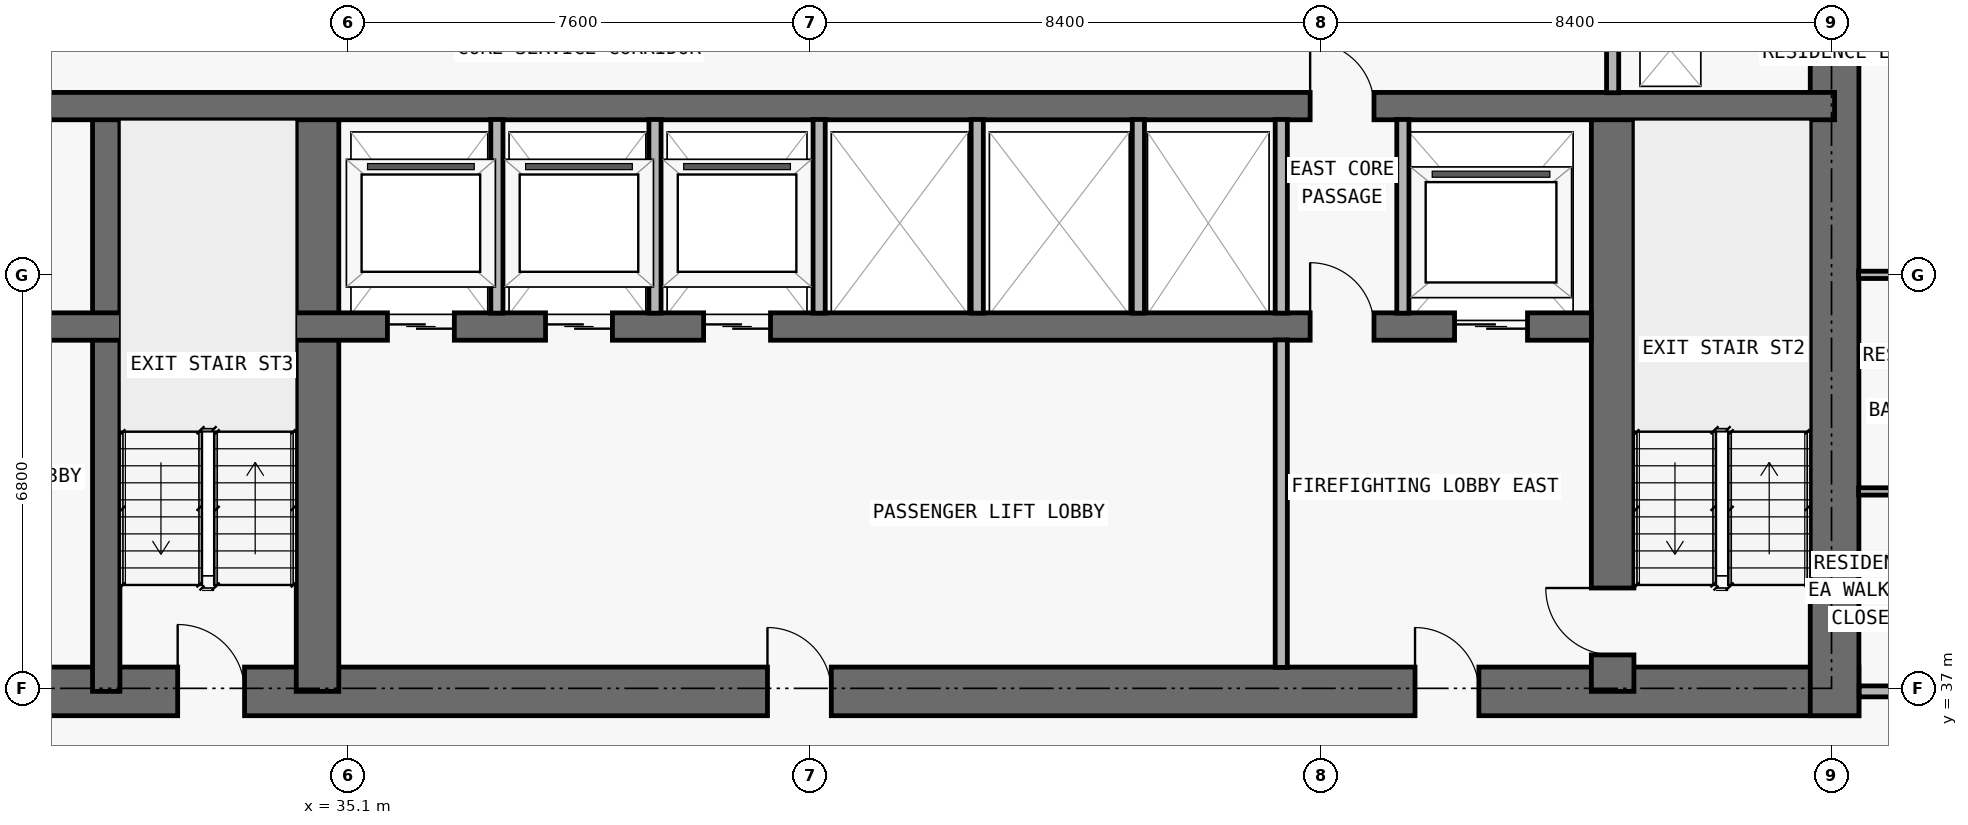
"""IFC4 building model, lengths in metres.
Left out: names, types, materials, properties, quantities, classifications, styles, units other than length and angle.
Written with IfcOpenShell. Run it as: python <this file> out.ifc"""

import sys

from ifc_helpers import new_model, si_unit, direction, frame, frame_2d, origin, place, context, subcontext, project, spatial, rectangle, extrude, element, fill, save


model = new_model("IFC4")
c1 = context("Model", 3, precision=1e-05, world=origin(), true_north=direction((0.0, 1.0)))
c2 = subcontext(c1, "Body", "Model", "MODEL_VIEW")
j1 = project(units=[si_unit("LENGTHUNIT", "METRE"), si_unit("PLANEANGLEUNIT", "RADIAN")], contexts=[c1])
p1 = place(None, origin())
s1 = spatial("IfcSite", under=j1, at=p1, CompositionType="ELEMENT")
p2 = place(p1, origin())
s2 = spatial("IfcBuilding", under=s1, at=p2, CompositionType="ELEMENT")
p3 = place(p2, frame((0.0, 0.0, 84.6)))
s3 = spatial("IfcBuildingStorey", under=s2, at=p3, CompositionType="ELEMENT", Elevation=84.6)
p4 = place(p3, frame((17.85, 36.95, 0.0), z_axis=(0.0, 0.0, 1.0), x_axis=(1.0, 0.0, 0.0)))
e1 = element("IfcWall", 1, at=p4, inside=s3, PredefinedType="SHEAR", context=c2, shape_type="SweptSolid", body=[
    extrude(rectangle(XDim=42.1, YDim=0.8, at=frame_2d((21.05, 0.0))), origin(), (0.0, 0.0, 1.0), 3.05),
])
p5 = place(p4, frame((14.45, 0.0, 0.0)))
e2 = element("IfcOpeningElement", 2, at=p5, cuts=e1, PredefinedType="OPENING", context=c2, shape_type="SweptSolid", body=[
    extrude(rectangle(XDim=1.1, YDim=2.15, at=frame_2d((0.55, 1.075))), frame((0.0, 0.41, 0.0), z_axis=(0.0, -1.0, 0.0), x_axis=(1.0, 0.0, 0.0)), (0.0, 0.0, 1.0), 0.82),
])
p6 = place(p4, frame((6.3, 0.0, 0.0)))
e3 = element("IfcOpeningElement", 3, at=p6, cuts=e1, PredefinedType="OPENING", context=c2, shape_type="SweptSolid", body=[
    extrude(rectangle(XDim=1.05, YDim=2.15, at=frame_2d((0.525, 1.075))), frame((0.0, 0.41, 0.0), z_axis=(0.0, -1.0, 0.0), x_axis=(1.0, 0.0, 0.0)), (0.0, 0.0, 1.0), 0.82),
])
p7 = place(p4, frame((34.8, 0.0, 0.0)))
e4 = element("IfcOpeningElement", 4, at=p7, cuts=e1, PredefinedType="OPENING", context=c2, shape_type="SweptSolid", body=[
    extrude(rectangle(XDim=1.05, YDim=2.15, at=frame_2d((0.525, 1.075))), frame((0.0, 0.41, 0.0), z_axis=(0.0, -1.0, 0.0), x_axis=(1.0, 0.0, 0.0)), (0.0, 0.0, 1.0), 0.82),
])
p8 = place(p4, frame((10.913, 0.0, 0.0)))
e5 = element("IfcOpeningElement", 5, at=p8, cuts=e1, PredefinedType="OPENING", context=c2, shape_type="SweptSolid", body=[
    extrude(rectangle(XDim=1.05, YDim=2.15, at=frame_2d((0.525, 1.075))), frame((0.0, 0.41, 0.0), z_axis=(0.0, -1.0, 0.0), x_axis=(1.0, 0.0, 0.0)), (0.0, 0.0, 1.0), 0.82),
])
p9 = place(p4, frame((24.15, 0.0, 0.0)))
e6 = element("IfcOpeningElement", 6, at=p9, cuts=e1, PredefinedType="OPENING", context=c2, shape_type="SweptSolid", body=[
    extrude(rectangle(XDim=1.05, YDim=2.15, at=frame_2d((0.525, 1.075))), frame((0.0, 0.41, 0.0), z_axis=(0.0, -1.0, 0.0), x_axis=(1.0, 0.0, 0.0)), (0.0, 0.0, 1.0), 0.82),
])
p10 = place(p3, frame((59.55, 36.55, 0.0), z_axis=(0.0, 0.0, 1.0), x_axis=(0.0, 1.0, 0.0)))
e7 = element("IfcWall", 7, at=p10, inside=s3, PredefinedType="SHEAR", context=c2, shape_type="SweptSolid", body=[
    extrude(rectangle(XDim=14.05, YDim=0.8, at=frame_2d((7.025, 0.0))), origin(), (0.0, 0.0, 1.0), 3.05),
])
p11 = place(p3, frame((55.9, 36.95, 0.0), z_axis=(0.0, 0.0, 1.0), x_axis=(0.0, 1.0, 0.0)))
e8 = element("IfcWall", 8, at=p11, inside=s3, PredefinedType="SHEAR", context=c2, shape_type="SweptSolid", body=[
    extrude(rectangle(XDim=9.625, YDim=0.7, at=frame_2d((4.812, 0.0))), origin(), (0.0, 0.0, 1.0), 3.05),
])
p12 = place(p11, frame((0.6, 0.0, 0.0)))
e9 = element("IfcOpeningElement", 9, at=p12, cuts=e8, PredefinedType="OPENING", context=c2, shape_type="SweptSolid", body=[
    extrude(rectangle(XDim=1.1, YDim=2.15, at=frame_2d((0.55, 1.075))), frame((0.0, 0.36, 0.0), z_axis=(0.0, -1.0, 0.0), x_axis=(1.0, 0.0, 0.0)), (0.0, 0.0, 1.0), 0.72),
])
p13 = place(p3, frame((31.125, 36.95, 0.0), z_axis=(0.0, 0.0, 1.0), x_axis=(0.0, 1.0, 0.0)))
e10 = element("IfcWall", 10, at=p13, inside=s3, PredefinedType="SHEAR", context=c2, shape_type="SweptSolid", body=[
    extrude(rectangle(XDim=9.625, YDim=0.45, at=frame_2d((4.812, 0.0))), origin(), (0.0, 0.0, 1.0), 3.05),
])
p14 = place(p3, frame((34.6, 36.95, 0.0), z_axis=(0.0, 0.0, 1.0), x_axis=(0.0, 1.0, 0.0)))
e11 = element("IfcWall", 11, at=p14, inside=s3, PredefinedType="SHEAR", context=c2, shape_type="SweptSolid", body=[
    extrude(rectangle(XDim=9.625, YDim=0.7, at=frame_2d((4.812, 0.0))), origin(), (0.0, 0.0, 1.0), 3.05),
])
p15 = place(p3, frame((22.25, 42.95, 0.0), z_axis=(0.0, 0.0, 1.0), x_axis=(1.0, 0.0, 0.0)))
e12 = element("IfcWall", 12, at=p15, inside=s3, PredefinedType="SHEAR", context=c2, shape_type="SweptSolid", body=[
    extrude(rectangle(XDim=33.3, YDim=0.45, at=frame_2d((16.65, 0.0))), origin(), (0.0, 0.0, 1.0), 3.05),
])
p16 = place(p15, frame((1.05, 0.0, 0.0)))
e13 = element("IfcOpeningElement", 13, at=p16, cuts=e12, PredefinedType="OPENING", context=c2, shape_type="SweptSolid", body=[
    extrude(rectangle(XDim=1.2, YDim=2.2, at=frame_2d((0.6, 1.1))), frame((0.0, 0.235, 0.0), z_axis=(0.0, -1.0, 0.0), x_axis=(1.0, 0.0, 0.0)), (0.0, 0.0, 1.0), 0.47),
])
p17 = place(p15, frame((31.05, 0.0, 0.0)))
e14 = element("IfcOpeningElement", 14, at=p17, cuts=e12, PredefinedType="OPENING", context=c2, shape_type="SweptSolid", body=[
    extrude(rectangle(XDim=1.2, YDim=2.2, at=frame_2d((0.6, 1.1))), frame((0.0, 0.235, 0.0), z_axis=(0.0, -1.0, 0.0), x_axis=(1.0, 0.0, 0.0)), (0.0, 0.0, 1.0), 0.47),
])
p18 = place(p15, frame((13.5, 0.0, 0.0)))
e15 = element("IfcOpeningElement", 15, at=p18, cuts=e12, PredefinedType="OPENING", context=c2, shape_type="SweptSolid", body=[
    extrude(rectangle(XDim=1.1, YDim=2.2, at=frame_2d((0.55, 1.1))), frame((0.0, 0.235, 0.0), z_axis=(0.0, -1.0, 0.0), x_axis=(1.0, 0.0, 0.0)), (0.0, 0.0, 1.0), 0.47),
])
p19 = place(p15, frame((16.1, 0.0, 0.0)))
e16 = element("IfcOpeningElement", 16, at=p19, cuts=e12, PredefinedType="OPENING", context=c2, shape_type="SweptSolid", body=[
    extrude(rectangle(XDim=1.1, YDim=2.2, at=frame_2d((0.55, 1.1))), frame((0.0, 0.235, 0.0), z_axis=(0.0, -1.0, 0.0), x_axis=(1.0, 0.0, 0.0)), (0.0, 0.0, 1.0), 0.47),
])
p20 = place(p15, frame((18.7, 0.0, 0.0)))
e17 = element("IfcOpeningElement", 17, at=p20, cuts=e12, PredefinedType="OPENING", context=c2, shape_type="SweptSolid", body=[
    extrude(rectangle(XDim=1.1, YDim=2.2, at=frame_2d((0.55, 1.1))), frame((0.0, 0.235, 0.0), z_axis=(0.0, -1.0, 0.0), x_axis=(1.0, 0.0, 0.0)), (0.0, 0.0, 1.0), 0.47),
])
p21 = place(p15, frame((3.625, 0.0, 0.0)))
e18 = element("IfcOpeningElement", 18, at=p21, cuts=e12, PredefinedType="OPENING", context=c2, shape_type="SweptSolid", body=[
    extrude(rectangle(XDim=1.05, YDim=2.15, at=frame_2d((0.525, 1.075))), frame((0.0, 0.235, 0.0), z_axis=(0.0, -1.0, 0.0), x_axis=(1.0, 0.0, 0.0)), (0.0, 0.0, 1.0), 0.47),
])
p22 = place(p15, frame((28.675, 0.0, 0.0)))
e19 = element("IfcOpeningElement", 19, at=p22, cuts=e12, PredefinedType="OPENING", context=c2, shape_type="SweptSolid", body=[
    extrude(rectangle(XDim=1.05, YDim=2.15, at=frame_2d((0.525, 1.075))), frame((0.0, 0.235, 0.0), z_axis=(0.0, -1.0, 0.0), x_axis=(1.0, 0.0, 0.0)), (0.0, 0.0, 1.0), 0.47),
])
p23 = place(p3, frame((18.25, 46.575, 0.0), z_axis=(0.0, 0.0, 1.0), x_axis=(1.0, 0.0, 0.0)))
e20 = element("IfcWall", 20, at=p23, inside=s3, PredefinedType="SHEAR", context=c2, shape_type="SweptSolid", body=[
    extrude(rectangle(XDim=41.3, YDim=0.45, at=frame_2d((20.65, 0.0))), origin(), (0.0, 0.0, 1.0), 3.05),
])
p24 = place(p23, frame((7.625, 0.0, 0.0)))
e21 = element("IfcOpeningElement", 21, at=p24, cuts=e20, PredefinedType="OPENING", context=c2, shape_type="SweptSolid", body=[
    extrude(rectangle(XDim=1.05, YDim=2.15, at=frame_2d((0.525, 1.075))), frame((0.0, 0.235, 0.0), z_axis=(0.0, -1.0, 0.0), x_axis=(1.0, 0.0, 0.0)), (0.0, 0.0, 1.0), 0.47),
])
p25 = place(p23, frame((32.675, 0.0, 0.0)))
e22 = element("IfcOpeningElement", 22, at=p25, cuts=e20, PredefinedType="OPENING", context=c2, shape_type="SweptSolid", body=[
    extrude(rectangle(XDim=1.05, YDim=2.15, at=frame_2d((0.525, 1.075))), frame((0.0, 0.235, 0.0), z_axis=(0.0, -1.0, 0.0), x_axis=(1.0, 0.0, 0.0)), (0.0, 0.0, 1.0), 0.47),
])
for number, where, z_axis, x_axis in (
    (23, (37.55, 43.17, 0.0), (0.0, 0.0, 1.0), (0.0, 1.0, 0.0)),
    (24, (40.15, 43.17, 0.0), (0.0, 0.0, 1.0), (0.0, 1.0, 0.0)),
    (25, (42.85, 43.17, 0.0), (0.0, 0.0, 1.0), (0.0, 1.0, 0.0)),
    (26, (45.45, 43.17, 0.0), (0.0, 0.0, 1.0), (0.0, 1.0, 0.0)),
    (27, (48.1, 43.17, 0.0), (0.0, 0.0, 1.0), (0.0, 1.0, 0.0)),
):
    element("IfcWall", number, at=place(p3, frame(where, z_axis=z_axis, x_axis=x_axis)), inside=s3, PredefinedType="PARTITIONING", context=c2, shape_type="SweptSolid", body=[
        extrude(rectangle(XDim=3.185, YDim=0.2, at=frame_2d((1.593, 0.0))), origin(), (0.0, 0.0, 1.0), 3.05),
    ])
p26 = place(p3, frame((50.45, 37.345, 0.0), z_axis=(0.0, 0.0, 1.0), x_axis=(0.0, 1.0, 0.0)))
e28 = element("IfcWall", 28, at=p26, inside=s3, PredefinedType="PARTITIONING", context=c2, shape_type="SweptSolid", body=[
    extrude(rectangle(XDim=5.385, YDim=0.2, at=frame_2d((2.692, 0.0))), origin(), (0.0, 0.0, 1.0), 3.05),
])
for number, where, z_axis, x_axis in (
    (29, (50.45, 43.17, 0.0), (0.0, 0.0, 1.0), (0.0, 1.0, 0.0)),
    (30, (52.45, 43.17, 0.0), (0.0, 0.0, 1.0), (0.0, 1.0, 0.0)),
):
    element("IfcWall", number, at=place(p3, frame(where, z_axis=z_axis, x_axis=x_axis)), inside=s3, PredefinedType="PARTITIONING", context=c2, shape_type="SweptSolid", body=[
        extrude(rectangle(XDim=3.185, YDim=0.2, at=frame_2d((1.593, 0.0))), origin(), (0.0, 0.0, 1.0), 3.05),
    ])
p27 = place(p3, frame((55.9, 46.795, 0.0), z_axis=(0.0, 0.0, 1.0), x_axis=(0.0, 1.0, 0.0)))
e31 = element("IfcWall", 31, at=p27, inside=s3, PredefinedType="PARTITIONING", context=c2, shape_type="SweptSolid", body=[
    extrude(rectangle(XDim=3.06, YDim=0.2, at=frame_2d((1.53, 0.0))), origin(), (0.0, 0.0, 1.0), 3.05),
])
p28 = place(p3, frame((59.955, 36.95, 0.0), z_axis=(0.0, 0.0, 1.0), x_axis=(1.0, 0.0, 0.0)))
e32 = element("IfcWall", 32, at=p28, inside=s3, PredefinedType="PARTITIONING", context=c2, shape_type="SweptSolid", body=[
    extrude(rectangle(XDim=10.145, YDim=0.18, at=frame_2d((5.073, 0.0))), origin(), (0.0, 0.0, 1.0), 3.05),
])
p29 = place(p28, frame((3.957, 0.0, 0.0)))
e33 = element("IfcOpeningElement", 33, at=p29, cuts=e32, PredefinedType="OPENING", context=c2, shape_type="SweptSolid", body=[
    extrude(rectangle(XDim=1.0, YDim=2.2, at=frame_2d((0.5, 1.1))), frame((0.0, 0.1, 0.0), z_axis=(0.0, -1.0, 0.0), x_axis=(1.0, 0.0, 0.0)), (0.0, 0.0, 1.0), 0.2),
])
p30 = place(p3, frame((59.945, 40.238, 0.0), z_axis=(0.0, 0.0, 1.0), x_axis=(1.0, 0.0, 0.0)))
e34 = element("IfcWall", 34, at=p30, inside=s3, PredefinedType="PARTITIONING", context=c2, shape_type="SweptSolid", body=[
    extrude(rectangle(XDim=2.255, YDim=0.12, at=frame_2d((1.127, 0.0))), origin(), (0.0, 0.0, 1.0), 3.05),
])
p31 = place(p3, frame((59.945, 43.8, 0.0), z_axis=(0.0, 0.0, 1.0), x_axis=(1.0, 0.0, 0.0)))
e35 = element("IfcWall", 35, at=p31, inside=s3, PredefinedType="PARTITIONING", context=c2, shape_type="SweptSolid", body=[
    extrude(rectangle(XDim=13.66, YDim=0.12, at=frame_2d((6.83, 0.0))), origin(), (0.0, 0.0, 1.0), 2.339),
])
p32 = place(p31, frame((4.017, 0.0, 0.0)))
e36 = element("IfcOpeningElement", 36, at=p32, cuts=e35, PredefinedType="OPENING", context=c2, shape_type="SweptSolid", body=[
    extrude(rectangle(XDim=0.9, YDim=2.15, at=frame_2d((0.45, 1.075))), frame((0.0, 0.07, 0.0), z_axis=(0.0, -1.0, 0.0), x_axis=(1.0, 0.0, 0.0)), (0.0, 0.0, 1.0), 0.14),
])
p33 = place(p31, frame((0.702, 0.0, 0.0)))
e37 = element("IfcOpeningElement", 37, at=p33, cuts=e35, PredefinedType="OPENING", context=c2, shape_type="SweptSolid", body=[
    extrude(rectangle(XDim=0.85, YDim=2.1, at=frame_2d((0.425, 1.05))), frame((0.0, 0.07, 0.0), z_axis=(0.0, -1.0, 0.0), x_axis=(1.0, 0.0, 0.0)), (0.0, 0.0, 1.0), 0.14),
])
p34 = place(p17, origin())
e38 = element("IfcDoor", 38, at=p34, inside=s3, OperationType="DOUBLE_DOOR_SLIDING", PredefinedType="DOOR", context=c2, shape_type="SweptSolid", body=[
    extrude(rectangle(XDim=1.2, YDim=2.2, at=frame_2d((0.6, 1.1))), frame((0.0, 0.025, 0.0), z_axis=(0.0, -1.0, 0.0), x_axis=(1.0, 0.0, 0.0)), (0.0, 0.0, 1.0), 0.05),
])
fill(e14, e38)
p35 = place(p18, origin())
e39 = element("IfcDoor", 39, at=p35, inside=s3, OperationType="DOUBLE_DOOR_SLIDING", PredefinedType="DOOR", context=c2, shape_type="SweptSolid", body=[
    extrude(rectangle(XDim=1.1, YDim=2.2, at=frame_2d((0.55, 1.1))), frame((0.0, 0.025, 0.0), z_axis=(0.0, -1.0, 0.0), x_axis=(1.0, 0.0, 0.0)), (0.0, 0.0, 1.0), 0.05),
])
fill(e15, e39)
p36 = place(p19, origin())
e40 = element("IfcDoor", 40, at=p36, inside=s3, OperationType="DOUBLE_DOOR_SLIDING", PredefinedType="DOOR", context=c2, shape_type="SweptSolid", body=[
    extrude(rectangle(XDim=1.1, YDim=2.2, at=frame_2d((0.55, 1.1))), frame((0.0, 0.025, 0.0), z_axis=(0.0, -1.0, 0.0), x_axis=(1.0, 0.0, 0.0)), (0.0, 0.0, 1.0), 0.05),
])
fill(e16, e40)
p37 = place(p20, origin())
e41 = element("IfcDoor", 41, at=p37, inside=s3, OperationType="DOUBLE_DOOR_SLIDING", PredefinedType="DOOR", context=c2, shape_type="SweptSolid", body=[
    extrude(rectangle(XDim=1.1, YDim=2.2, at=frame_2d((0.55, 1.1))), frame((0.0, 0.025, 0.0), z_axis=(0.0, -1.0, 0.0), x_axis=(1.0, 0.0, 0.0)), (0.0, 0.0, 1.0), 0.05),
])
fill(e17, e41)
p38 = place(p5, origin())
e42 = element("IfcDoor", 42, at=p38, inside=s3, OperationType="SINGLE_SWING_LEFT", PredefinedType="DOOR", context=c2, shape_type="SweptSolid", body=[
    extrude(rectangle(XDim=1.1, YDim=2.15, at=frame_2d((0.55, 1.075))), frame((0.0, 0.025, 0.0), z_axis=(0.0, -1.0, 0.0), x_axis=(1.0, 0.0, 0.0)), (0.0, 0.0, 1.0), 0.05),
])
fill(e2, e42)
p39 = place(p7, origin())
e43 = element("IfcDoor", 43, at=p39, inside=s3, OperationType="SINGLE_SWING_LEFT", PredefinedType="DOOR", context=c2, shape_type="SweptSolid", body=[
    extrude(rectangle(XDim=1.05, YDim=2.15, at=frame_2d((0.525, 1.075))), frame((0.0, 0.025, 0.0), z_axis=(0.0, -1.0, 0.0), x_axis=(1.0, 0.0, 0.0)), (0.0, 0.0, 1.0), 0.05),
])
fill(e4, e43)
p40 = place(p12, origin())
e44 = element("IfcDoor", 44, at=p40, inside=s3, OperationType="SINGLE_SWING_RIGHT", PredefinedType="DOOR", context=c2, shape_type="SweptSolid", body=[
    extrude(rectangle(XDim=1.1, YDim=2.15, at=frame_2d((0.55, 1.075))), frame((0.0, 0.025, 0.0), z_axis=(0.0, -1.0, 0.0), x_axis=(1.0, 0.0, 0.0)), (0.0, 0.0, 1.0), 0.05),
])
fill(e9, e44)
p41 = place(p22, origin())
e45 = element("IfcDoor", 45, at=p41, inside=s3, OperationType="SINGLE_SWING_LEFT", PredefinedType="DOOR", context=c2, shape_type="SweptSolid", body=[
    extrude(rectangle(XDim=1.05, YDim=2.15, at=frame_2d((0.525, 1.075))), frame((0.0, 0.025, 0.0), z_axis=(0.0, -1.0, 0.0), x_axis=(1.0, 0.0, 0.0)), (0.0, 0.0, 1.0), 0.05),
])
fill(e19, e45)
p42 = place(p9, origin())
e46 = element("IfcDoor", 46, at=p42, inside=s3, OperationType="SINGLE_SWING_LEFT", PredefinedType="DOOR", context=c2, shape_type="SweptSolid", body=[
    extrude(rectangle(XDim=1.05, YDim=2.15, at=frame_2d((0.525, 1.075))), frame((0.0, 0.025, 0.0), z_axis=(0.0, -1.0, 0.0), x_axis=(1.0, 0.0, 0.0)), (0.0, 0.0, 1.0), 0.05),
])
fill(e6, e46)
p43 = place(p25, origin())
e47 = element("IfcDoor", 47, at=p43, inside=s3, OperationType="SINGLE_SWING_LEFT", PredefinedType="DOOR", context=c2, shape_type="SweptSolid", body=[
    extrude(rectangle(XDim=1.05, YDim=2.15, at=frame_2d((0.525, 1.075))), frame((0.0, 0.025, 0.0), z_axis=(0.0, -1.0, 0.0), x_axis=(1.0, 0.0, 0.0)), (0.0, 0.0, 1.0), 0.05),
])
fill(e22, e47)
save(model, sys.argv[1])
